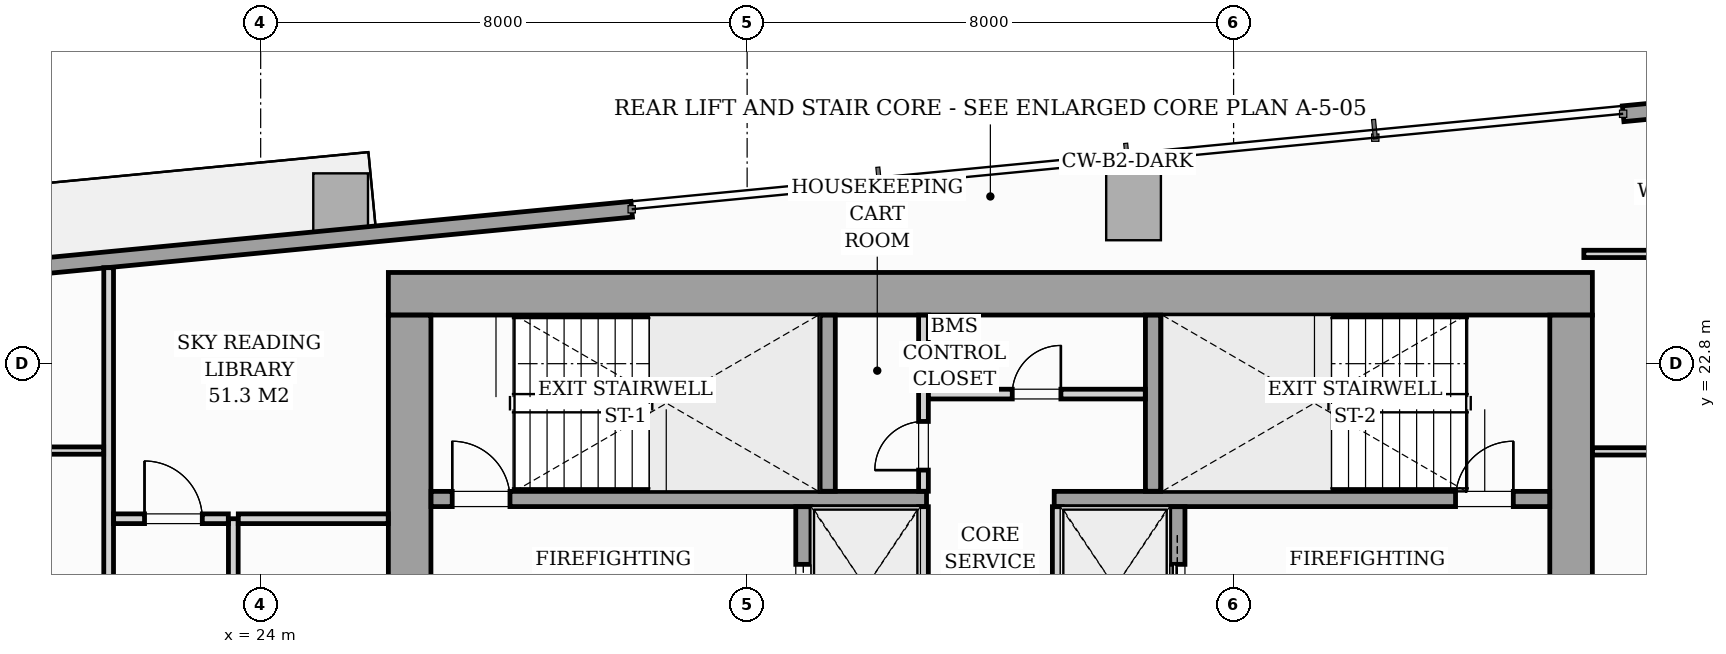
"""IFC4 building model, lengths in metres.
Left out: names, types, materials, properties, quantities, classifications, styles, units other than length and angle.
Written with IfcOpenShell. Run it as: python <this file> out.ifc"""

import sys

from ifc_helpers import new_model, si_unit, direction, frame, frame_2d, origin, origin_2d, place, context, subcontext, project, spatial, rectangle, i_section, extrude, source, transform, mapped, element, fill, save


model = new_model("IFC4")
c1 = context("Model", 3, precision=1e-05, world=origin(), true_north=direction((0.0, 1.0)))
c2 = subcontext(c1, "Body", "Model", "MODEL_VIEW")
j1 = project(units=[si_unit("LENGTHUNIT", "METRE"), si_unit("PLANEANGLEUNIT", "RADIAN")], contexts=[c1])
p1 = place(None, origin())
s1 = spatial("IfcSite", under=j1, at=p1, CompositionType="ELEMENT")
p2 = place(p1, origin())
s2 = spatial("IfcBuilding", under=s1, at=p2, CompositionType="ELEMENT")
p3 = place(p2, frame((0.0, 0.0, 103.4)))
s3 = spatial("IfcBuildingStorey", under=s2, at=p3, CompositionType="ELEMENT", Elevation=103.4)
m1 = source(origin(), c2, "Body", "SweptSolid", [
    extrude(i_section(OverallWidth=0.427, OverallDepth=0.483, WebThickness=0.051, FlangeThickness=0.082, FilletRadius=0.018, at=origin_2d()), origin(), (0.0, 0.0, 1.0), 3.196),
])
for number, where, z_axis, x_axis in (
    (1, (26.4, 24.0, 0.002), (0.0, 0.0, 1.0), (1.0, 0.0, 0.0)),
    (2, (33.12, 24.0, 0.002), (0.0, 0.0, 1.0), (1.0, 0.0, 0.0)),
    (3, (38.88, 24.0, 0.002), (0.0, 0.0, 1.0), (1.0, 0.0, 0.0)),
    (4, (45.6, 24.0, 0.002), (0.0, 0.0, 1.0), (1.0, 0.0, 0.0)),
):
    element("IfcColumn", number, at=place(p3, frame(where, z_axis=z_axis, x_axis=x_axis)), inside=s3, PredefinedType="PILASTER", context=c2, shape_type="MappedRepresentation", body=[
        mapped(m1, transform((0.0, 0.0, 0.0), scale=1.0)),
    ])
m2 = source(origin(), c2, "Body", "SweptSolid", [
    extrude(rectangle(XDim=0.9, YDim=1.1, at=origin_2d()), origin(), (0.0, 0.0, 1.0), 3.196),
])
for number, where, z_axis, x_axis in (
    (5, (25.315, 25.38, 0.002), (0.0, 0.0, 1.0), (0.995, 0.096, 0.0)),
    (6, (38.354, 25.38, 0.002), (0.0, 0.0, 1.0), (0.995, 0.096, 0.0)),
):
    element("IfcColumn", number, at=place(p3, frame(where, z_axis=z_axis, x_axis=x_axis)), inside=s3, PredefinedType="COLUMN", context=c2, shape_type="MappedRepresentation", body=[
        mapped(m2, transform((0.0, 0.0, 0.0), scale=1.0)),
    ])
p4 = place(p3, frame((11.08, 23.508, 0.0), z_axis=(0.0, 0.0, 1.0), x_axis=(0.995396638587, 0.095841180552, 0.0)))
e7 = element("IfcWall", 7, at=p4, inside=s3, PredefinedType="STANDARD", context=c2, shape_type="SweptSolid", body=[
    extrude(rectangle(XDim=19.11, YDim=0.26, at=frame_2d((9.555, 0.0))), origin(), (0.0, 0.0, 1.0), 2.94),
])
p5 = place(p4, frame((6.896, 0.0, 0.0)))
e8 = element("IfcOpeningElement", 8, at=p5, cuts=e7, PredefinedType="OPENING", context=c2, shape_type="SweptSolid", body=[
    extrude(rectangle(XDim=1.8, YDim=2.06, at=frame_2d((0.9, 1.03))), frame((0.0, 0.14, 0.0), z_axis=(0.0, -1.0, 0.0), x_axis=(1.0, 0.0, 0.0)), (0.0, 0.0, 1.0), 0.28),
])
p6 = place(p4, frame((2.05, 0.0, 0.65)))
e9 = element("IfcOpeningElement", 9, at=p6, cuts=e7, PredefinedType="OPENING", context=c2, shape_type="SweptSolid", body=[
    extrude(rectangle(XDim=1.6, YDim=1.5, at=frame_2d((0.8, 0.75))), frame((0.0, 0.14, 0.0), z_axis=(0.0, -1.0, 0.0), x_axis=(1.0, 0.0, 0.0)), (0.0, 0.0, 1.0), 0.28),
])
p7 = place(p3, frame((46.406, 26.91, 0.0), z_axis=(0.0, 0.0, 1.0), x_axis=(0.995396638587, 0.095841180552, 0.0)))
e10 = element("IfcWall", 10, at=p7, inside=s3, PredefinedType="STANDARD", context=c2, shape_type="SweptSolid", body=[
    extrude(rectangle(XDim=19.11, YDim=0.26, at=frame_2d((9.555, 0.0))), origin(), (0.0, 0.0, 1.0), 2.94),
])
p8 = place(p7, frame((9.77, 0.0, 0.0)))
e11 = element("IfcOpeningElement", 11, at=p8, cuts=e10, PredefinedType="OPENING", context=c2, shape_type="SweptSolid", body=[
    extrude(rectangle(XDim=1.8, YDim=2.06, at=frame_2d((0.9, 1.03))), frame((0.0, 0.14, 0.0), z_axis=(0.0, -1.0, 0.0), x_axis=(1.0, 0.0, 0.0)), (0.0, 0.0, 1.0), 0.28),
])
p9 = place(p7, frame((0.7, 0.0, 0.65)))
e12 = element("IfcOpeningElement", 12, at=p9, cuts=e10, PredefinedType="OPENING", context=c2, shape_type="SweptSolid", body=[
    extrude(rectangle(XDim=1.6, YDim=1.5, at=frame_2d((0.8, 0.75))), frame((0.0, 0.14, 0.0), z_axis=(0.0, -1.0, 0.0), x_axis=(1.0, 0.0, 0.0)), (0.0, 0.0, 1.0), 0.28),
])
p10 = place(p3, frame((26.1, 23.95, 0.0), z_axis=(0.0, 0.0, 1.0), x_axis=(1.0, 0.0, 0.0)))
e13 = element("IfcWall", 13, at=p10, inside=s3, PredefinedType="SHEAR", context=c2, shape_type="SweptSolid", body=[
    extrude(rectangle(XDim=19.8, YDim=0.7, at=frame_2d((9.9, 0.0))), origin(), (0.0, 0.0, 1.0), 3.2),
])
for number, where, z_axis, x_axis in (
    (14, (26.45, 17.802, 0.0), (0.0, 0.0, 1.0), (0.0, 1.0, 0.0)),
    (15, (45.55, 17.802, 0.0), (0.0, 0.0, 1.0), (0.0, 1.0, 0.0)),
):
    element("IfcWall", number, at=place(p3, frame(where, z_axis=z_axis, x_axis=x_axis)), inside=s3, PredefinedType="SHEAR", context=c2, shape_type="SweptSolid", body=[
        extrude(rectangle(XDim=5.796, YDim=0.7, at=frame_2d((2.898, 0.0))), origin(), (0.0, 0.0, 1.0), 3.2),
    ])
p11 = place(p3, frame((26.802, 20.575, 0.0), z_axis=(0.0, 0.0, 1.0), x_axis=(1.0, 0.0, 0.0)))
e16 = element("IfcWall", 16, at=p11, inside=s3, PredefinedType="SOLIDWALL", context=c2, shape_type="SweptSolid", body=[
    extrude(rectangle(XDim=8.148, YDim=0.25, at=frame_2d((4.074, 0.0))), origin(), (0.0, 0.0, 1.0), 3.2),
])
p12 = place(p11, frame((0.348, 0.0, 0.0)))
e17 = element("IfcOpeningElement", 17, at=p12, cuts=e16, PredefinedType="OPENING", context=c2, shape_type="SweptSolid", body=[
    extrude(rectangle(XDim=0.95, YDim=2.06, at=frame_2d((0.475, 1.03))), frame((0.0, 0.135, 0.0), z_axis=(0.0, -1.0, 0.0), x_axis=(1.0, 0.0, 0.0)), (0.0, 0.0, 1.0), 0.27),
])
p13 = place(p3, frame((37.05, 20.575, 0.0), z_axis=(0.0, 0.0, 1.0), x_axis=(1.0, 0.0, 0.0)))
e18 = element("IfcWall", 18, at=p13, inside=s3, PredefinedType="SOLIDWALL", context=c2, shape_type="SweptSolid", body=[
    extrude(rectangle(XDim=8.148, YDim=0.25, at=frame_2d((4.074, 0.0))), origin(), (0.0, 0.0, 1.0), 3.2),
])
p14 = place(p13, frame((6.6, 0.0, 0.0)))
e19 = element("IfcOpeningElement", 19, at=p14, cuts=e18, PredefinedType="OPENING", context=c2, shape_type="SweptSolid", body=[
    extrude(rectangle(XDim=0.95, YDim=2.06, at=frame_2d((0.475, 1.03))), frame((0.0, 0.135, 0.0), z_axis=(0.0, -1.0, 0.0), x_axis=(1.0, 0.0, 0.0)), (0.0, 0.0, 1.0), 0.27),
])
for number, where, z_axis, x_axis in (
    (20, (33.325, 20.702, 0.0), (0.0, 0.0, 1.0), (0.0, 1.0, 0.0)),
    (21, (38.675, 20.702, 0.0), (0.0, 0.0, 1.0), (0.0, 1.0, 0.0)),
):
    element("IfcWall", number, at=place(p3, frame(where, z_axis=z_axis, x_axis=x_axis)), inside=s3, PredefinedType="SOLIDWALL", context=c2, shape_type="SweptSolid", body=[
        extrude(rectangle(XDim=2.896, YDim=0.25, at=frame_2d((1.448, 0.0))), origin(), (0.0, 0.0, 1.0), 3.2),
    ])
p15 = place(p3, frame((32.925, 17.802, 0.0), z_axis=(0.0, 0.0, 1.0), x_axis=(0.0, 1.0, 0.0)))
e22 = element("IfcWall", 22, at=p15, inside=s3, PredefinedType="SOLIDWALL", context=c2, shape_type="SweptSolid", body=[
    extrude(rectangle(XDim=2.646, YDim=0.25, at=frame_2d((1.323, 0.0))), origin(), (0.0, 0.0, 1.0), 3.2),
])
p16 = place(p15, frame((0.598, 0.0, 0.0)))
e23 = element("IfcOpeningElement", 23, at=p16, cuts=e22, PredefinedType="OPENING", context=c2, shape_type="SweptSolid", body=[
    extrude(rectangle(XDim=1.1, YDim=2.08, at=frame_2d((0.55, 1.04))), frame((0.0, 0.135, 0.0), z_axis=(0.0, -1.0, 0.0), x_axis=(1.0, 0.0, 0.0)), (0.0, 0.0, 1.0), 0.27),
])
for number, where, z_axis, x_axis in (
    (24, (34.9, 17.802, 0.0), (0.0, 0.0, 1.0), (0.0, 1.0, 0.0)),
    (25, (37.1, 17.802, 0.0), (0.0, 0.0, 1.0), (0.0, 1.0, 0.0)),
):
    element("IfcWall", number, at=place(p3, frame(where, z_axis=z_axis, x_axis=x_axis)), inside=s3, PredefinedType="PARTITIONING", context=c2, shape_type="SweptSolid", body=[
        extrude(rectangle(XDim=2.646, YDim=0.16, at=frame_2d((1.323, 0.0))), origin(), (0.0, 0.0, 1.0), 2.94),
    ])
p17 = place(p3, frame((39.075, 17.802, 0.0), z_axis=(0.0, 0.0, 1.0), x_axis=(0.0, 1.0, 0.0)))
e26 = element("IfcWall", 26, at=p17, inside=s3, PredefinedType="SOLIDWALL", context=c2, shape_type="SweptSolid", body=[
    extrude(rectangle(XDim=2.646, YDim=0.25, at=frame_2d((1.323, 0.0))), origin(), (0.0, 0.0, 1.0), 3.2),
])
p18 = place(p17, frame((0.598, 0.0, 0.0)))
e27 = element("IfcOpeningElement", 27, at=p18, cuts=e26, PredefinedType="OPENING", context=c2, shape_type="SweptSolid", body=[
    extrude(rectangle(XDim=1.1, YDim=2.08, at=frame_2d((0.55, 1.04))), frame((0.0, 0.135, 0.0), z_axis=(0.0, -1.0, 0.0), x_axis=(1.0, 0.0, 0.0)), (0.0, 0.0, 1.0), 0.27),
])
p19 = place(p3, frame((34.9, 20.702, 0.0), z_axis=(0.0, 0.0, 1.0), x_axis=(0.0, 1.0, 0.0)))
e28 = element("IfcWall", 28, at=p19, inside=s3, PredefinedType="PARTITIONING", context=c2, shape_type="SweptSolid", body=[
    extrude(rectangle(XDim=2.896, YDim=0.16, at=frame_2d((1.448, 0.0))), origin(), (0.0, 0.0, 1.0), 2.94),
])
p20 = place(p19, frame((0.348, 0.0, 0.0)))
e29 = element("IfcOpeningElement", 29, at=p20, cuts=e28, PredefinedType="OPENING", context=c2, shape_type="SweptSolid", body=[
    extrude(rectangle(XDim=0.8, YDim=2.05, at=frame_2d((0.4, 1.025))), frame((0.0, 0.09, 0.0), z_axis=(0.0, -1.0, 0.0), x_axis=(1.0, 0.0, 0.0)), (0.0, 0.0, 1.0), 0.18),
])
p21 = place(p3, frame((34.982, 22.3, 0.0), z_axis=(0.0, 0.0, 1.0), x_axis=(1.0, 0.0, 0.0)))
e30 = element("IfcWall", 30, at=p21, inside=s3, PredefinedType="PARTITIONING", context=c2, shape_type="SweptSolid", body=[
    extrude(rectangle(XDim=3.566, YDim=0.16, at=frame_2d((1.783, 0.0))), origin(), (0.0, 0.0, 1.0), 2.94),
])
p22 = place(p21, frame((1.378, 0.0, 0.0)))
e31 = element("IfcOpeningElement", 31, at=p22, cuts=e30, PredefinedType="OPENING", context=c2, shape_type="SweptSolid", body=[
    extrude(rectangle(XDim=0.8, YDim=2.05, at=frame_2d((0.4, 1.025))), frame((0.0, 0.09, 0.0), z_axis=(0.0, -1.0, 0.0), x_axis=(1.0, 0.0, 0.0)), (0.0, 0.0, 1.0), 0.18),
])
p23 = place(p3, frame((21.5, 12.632, 0.0), z_axis=(0.0, 0.0, 1.0), x_axis=(0.0, 1.0, 0.0)))
e32 = element("IfcWall", 32, at=p23, inside=s3, PredefinedType="PARTITIONING", context=c2, shape_type="SweptSolid", body=[
    extrude(rectangle(XDim=11.747, YDim=0.16, at=frame_2d((5.873, 0.0))), origin(), (0.0, 0.0, 1.0), 2.94),
])
p24 = place(p23, frame((0.493, 0.0, 0.0)))
e33 = element("IfcOpeningElement", 33, at=p24, cuts=e32, PredefinedType="OPENING", context=c2, shape_type="SweptSolid", body=[
    extrude(rectangle(XDim=0.95, YDim=2.06, at=frame_2d((0.475, 1.03))), frame((0.0, 0.09, 0.0), z_axis=(0.0, -1.0, 0.0), x_axis=(1.0, 0.0, 0.0)), (0.0, 0.0, 1.0), 0.18),
])
p25 = place(p3, frame((10.293, 21.371, 0.0), z_axis=(0.0, 0.0, 1.0), x_axis=(1.0, 0.0, 0.0)))
e34 = element("IfcWall", 34, at=p25, inside=s3, PredefinedType="PARTITIONING", context=c2, shape_type="SweptSolid", body=[
    extrude(rectangle(XDim=11.125, YDim=0.12, at=frame_2d((5.562, 0.0))), origin(), (0.0, 0.0, 1.0), 2.94),
])
p26 = place(p25, frame((6.33, 0.0, 0.0)))
e35 = element("IfcOpeningElement", 35, at=p26, cuts=e34, PredefinedType="OPENING", context=c2, shape_type="SweptSolid", body=[
    extrude(rectangle(XDim=0.85, YDim=2.05, at=frame_2d((0.425, 1.025))), frame((0.0, 0.07, 0.0), z_axis=(0.0, -1.0, 0.0), x_axis=(1.0, 0.0, 0.0)), (0.0, 0.0, 1.0), 0.14),
])
p27 = place(p3, frame((45.76, 24.605, 0.0), z_axis=(0.0, 0.0, 1.0), x_axis=(1.0, 0.0, 0.0)))
e36 = element("IfcWall", 36, at=p27, inside=s3, PredefinedType="PARTITIONING", context=c2, shape_type="SweptSolid", body=[
    extrude(rectangle(XDim=22.498, YDim=0.12, at=frame_2d((11.249, 0.0))), origin(), (0.0, 0.0, 1.0), 2.94),
])
p28 = place(p27, frame((10.931, 0.0, 0.0)))
e37 = element("IfcOpeningElement", 37, at=p28, cuts=e36, PredefinedType="OPENING", context=c2, shape_type="SweptSolid", body=[
    extrude(rectangle(XDim=0.85, YDim=2.05, at=frame_2d((0.425, 1.025))), frame((0.0, 0.07, 0.0), z_axis=(0.0, -1.0, 0.0), x_axis=(1.0, 0.0, 0.0)), (0.0, 0.0, 1.0), 0.14),
])
p29 = place(p3, frame((45.902, 21.358, 0.0), z_axis=(0.0, 0.0, 1.0), x_axis=(1.0, 0.0, 0.0)))
e38 = element("IfcWall", 38, at=p29, inside=s3, PredefinedType="PARTITIONING", context=c2, shape_type="SweptSolid", body=[
    extrude(rectangle(XDim=22.668, YDim=0.12, at=frame_2d((11.334, 0.0))), origin(), (0.0, 0.0, 1.0), 2.94),
])
p30 = place(p29, frame((10.945, 0.0, 0.0)))
e39 = element("IfcOpeningElement", 39, at=p30, cuts=e38, PredefinedType="OPENING", context=c2, shape_type="SweptSolid", body=[
    extrude(rectangle(XDim=0.85, YDim=2.05, at=frame_2d((0.425, 1.025))), frame((0.0, 0.07, 0.0), z_axis=(0.0, -1.0, 0.0), x_axis=(1.0, 0.0, 0.0)), (0.0, 0.0, 1.0), 0.14),
])
p31 = place(p3, frame((23.55, 14.66, 0.0), z_axis=(0.0, 0.0, 1.0), x_axis=(0.0, 1.0, 0.0)))
e40 = element("IfcWall", 40, at=p31, inside=s3, PredefinedType="PARTITIONING", context=c2, shape_type="SweptSolid", body=[
    extrude(rectangle(XDim=5.59, YDim=0.16, at=frame_2d((2.795, 0.0))), origin(), (0.0, 0.0, 1.0), 2.94),
])
p32 = place(p31, frame((2.36, 0.0, 0.0)))
e41 = element("IfcOpeningElement", 41, at=p32, cuts=e40, PredefinedType="OPENING", context=c2, shape_type="SweptSolid", body=[
    extrude(rectangle(XDim=0.95, YDim=2.06, at=frame_2d((0.475, 1.03))), frame((0.0, 0.09, 0.0), z_axis=(0.0, -1.0, 0.0), x_axis=(1.0, 0.0, 0.0)), (0.0, 0.0, 1.0), 0.18),
])
p33 = place(p3, frame((21.582, 20.25, 0.0), z_axis=(0.0, 0.0, 1.0), x_axis=(1.0, 0.0, 0.0)))
e42 = element("IfcWall", 42, at=p33, inside=s3, PredefinedType="PARTITIONING", context=c2, shape_type="SweptSolid", body=[
    extrude(rectangle(XDim=1.886, YDim=0.16, at=frame_2d((0.943, 0.0))), origin(), (0.0, 0.0, 1.0), 2.94),
])
p34 = place(p33, frame((0.508, 0.0, 0.0)))
e43 = element("IfcOpeningElement", 43, at=p34, cuts=e42, PredefinedType="OPENING", context=c2, shape_type="SweptSolid", body=[
    extrude(rectangle(XDim=0.95, YDim=2.06, at=frame_2d((0.475, 1.03))), frame((0.0, 0.09, 0.0), z_axis=(0.0, -1.0, 0.0), x_axis=(1.0, 0.0, 0.0)), (0.0, 0.0, 1.0), 0.18),
])
p35 = place(p3, frame((23.632, 20.25, 0.0), z_axis=(0.0, 0.0, 1.0), x_axis=(1.0, 0.0, 0.0)))
e44 = element("IfcWall", 44, at=p35, inside=s3, PredefinedType="PARTITIONING", context=c2, shape_type="SweptSolid", body=[
    extrude(rectangle(XDim=2.466, YDim=0.16, at=frame_2d((1.233, 0.0))), origin(), (0.0, 0.0, 1.0), 2.94),
])
m3 = source(origin(), c2, "Body", "SweptSolid", [
    extrude(rectangle(XDim=0.95, YDim=2.06, at=frame_2d((0.475, 1.03))), frame((0.0, 0.025, 0.0), z_axis=(0.0, -1.0, 0.0), x_axis=(1.0, 0.0, 0.0)), (0.0, 0.0, 1.0), 0.05),
])
p36 = place(p12, origin())
e45 = element("IfcDoor", 45, at=p36, inside=s3, OperationType="SINGLE_SWING_LEFT", PredefinedType="DOOR", context=c2, shape_type="MappedRepresentation", body=[
    mapped(m3, transform((0.0, 0.0, 0.0), scale=1.0)),
])
fill(e17, e45)
p37 = place(p14, origin())
e46 = element("IfcDoor", 46, at=p37, inside=s3, OperationType="SINGLE_SWING_RIGHT", PredefinedType="DOOR", context=c2, shape_type="MappedRepresentation", body=[
    mapped(m3, transform((0.0, 0.0, 0.0), scale=1.0)),
])
fill(e19, e46)
m4 = source(origin(), c2, "Body", "SweptSolid", [
    extrude(rectangle(XDim=1.1, YDim=2.08, at=frame_2d((0.55, 1.04))), frame((0.0, 0.025, 0.0), z_axis=(0.0, -1.0, 0.0), x_axis=(1.0, 0.0, 0.0)), (0.0, 0.0, 1.0), 0.05),
])
p38 = place(p16, origin())
e47 = element("IfcDoor", 47, at=p38, inside=s3, OperationType="SLIDING_TO_LEFT", PredefinedType="DOOR", context=c2, shape_type="MappedRepresentation", body=[
    mapped(m4, transform((0.0, 0.0, 0.0), scale=1.0)),
])
fill(e23, e47)
p39 = place(p18, origin())
e48 = element("IfcDoor", 48, at=p39, inside=s3, OperationType="SLIDING_TO_RIGHT", PredefinedType="DOOR", context=c2, shape_type="MappedRepresentation", body=[
    mapped(m4, transform((0.0, 0.0, 0.0), scale=1.0)),
])
fill(e27, e48)
m5 = source(origin(), c2, "Body", "SweptSolid", [
    extrude(rectangle(XDim=0.8, YDim=2.05, at=frame_2d((0.4, 1.025))), frame((0.0, 0.025, 0.0), z_axis=(0.0, -1.0, 0.0), x_axis=(1.0, 0.0, 0.0)), (0.0, 0.0, 1.0), 0.05),
])
p40 = place(p20, origin())
e49 = element("IfcDoor", 49, at=p40, inside=s3, OperationType="SINGLE_SWING_LEFT", PredefinedType="DOOR", context=c2, shape_type="MappedRepresentation", body=[
    mapped(m5, transform((0.0, 0.0, 0.0), scale=1.0)),
])
fill(e29, e49)
p41 = place(p22, origin())
e50 = element("IfcDoor", 50, at=p41, inside=s3, OperationType="SINGLE_SWING_RIGHT", PredefinedType="DOOR", context=c2, shape_type="MappedRepresentation", body=[
    mapped(m5, transform((0.0, 0.0, 0.0), scale=1.0)),
])
fill(e31, e50)
m6 = source(origin(), c2, "Body", "SweptSolid", [
    extrude(rectangle(XDim=0.95, YDim=2.06, at=frame_2d((0.475, 1.03))), frame((0.0, 0.025, 0.0), z_axis=(0.0, -1.0, 0.0), x_axis=(1.0, 0.0, 0.0)), (0.0, 0.0, 1.0), 0.05),
])
p42 = place(p34, origin())
e51 = element("IfcDoor", 51, at=p42, inside=s3, OperationType="SINGLE_SWING_LEFT", PredefinedType="DOOR", context=c2, shape_type="MappedRepresentation", body=[
    mapped(m6, transform((0.0, 0.0, 0.0), scale=1.0)),
])
fill(e43, e51)
save(model, sys.argv[1])
